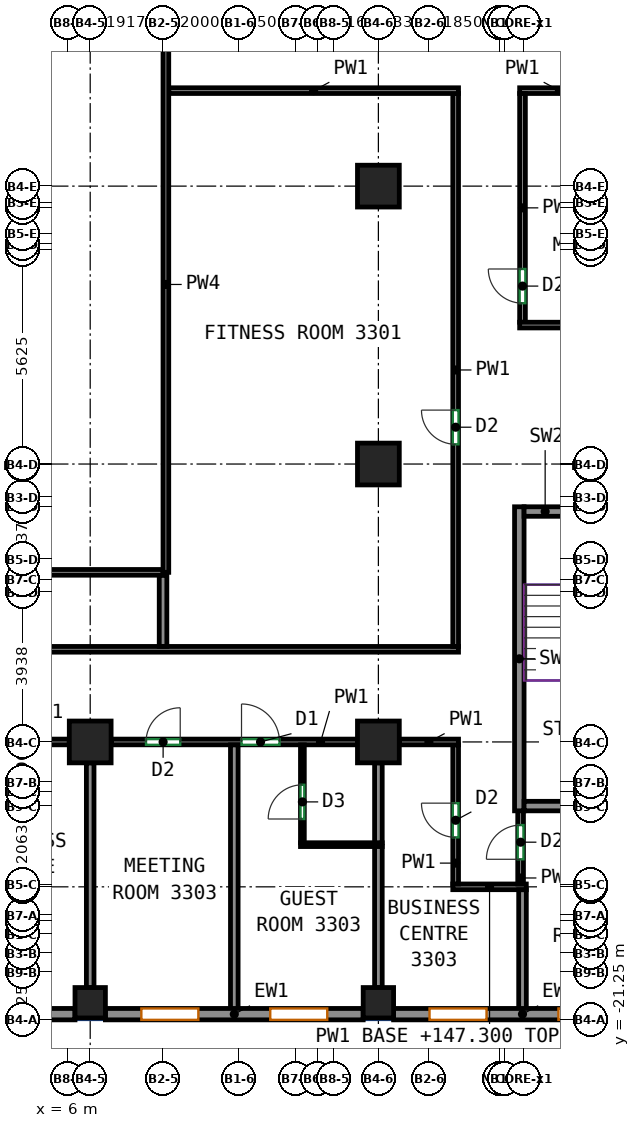
"""IFC4 building model, lengths in metres.
Left out: names, types, materials, properties, quantities, classifications, styles, units other than length and angle.
Written with IfcOpenShell. Run it as: python <this file> out.ifc"""

import sys

from ifc_helpers import new_model, si_unit, direction, frame, frame_2d, origin, origin_2d, place, context, subcontext, project, spatial, rectangle, extrude, source, transform, mapped, element, fill, save


model = new_model("IFC4")
c1 = context("Model", 3, precision=1e-05, world=origin(), true_north=direction((0.0, 1.0)))
c2 = subcontext(c1, "Body", "Model", "MODEL_VIEW")
j1 = project(units=[si_unit("LENGTHUNIT", "METRE"), si_unit("PLANEANGLEUNIT", "RADIAN")], contexts=[c1])
p1 = place(None, origin())
s1 = spatial("IfcSite", under=j1, at=p1, CompositionType="ELEMENT")
p2 = place(p1, origin())
s2 = spatial("IfcBuilding", under=s1, at=p2, CompositionType="ELEMENT")
p3 = place(p2, frame((0.0, 0.0, 147.3)))
s3 = spatial("IfcBuildingStorey", under=s2, at=p3, CompositionType="ELEMENT", Elevation=147.3)
m1 = source(origin(), c2, "Body", "SweptSolid", [
    extrude(rectangle(XDim=0.8, YDim=0.8, at=origin_2d()), origin(), (0.0, 0.0, 1.0), 3.12),
])
p4 = place(p3, frame((6.583, -20.8, 0.0), z_axis=(0.0, 0.0, 1.0), x_axis=(1.0, 0.0, 0.0)))
e1 = element("IfcColumn", 1, at=p4, inside=s3, PredefinedType="COLUMN", context=c2, shape_type="MappedRepresentation", body=[
    mapped(m1, transform((0.0, 0.0, 0.0))),
])
m2 = source(origin(), c2, "Body", "SweptSolid", [
    extrude(rectangle(XDim=1.1, YDim=1.1, at=origin_2d()), origin(), (0.0, 0.0, 1.0), 3.12),
])
p5 = place(p3, frame((6.583, -13.938, 0.0), z_axis=(0.0, 0.0, 1.0), x_axis=(1.0, 0.0, 0.0)))
e2 = element("IfcColumn", 2, at=p5, inside=s3, PredefinedType="COLUMN", context=c2, shape_type="MappedRepresentation", body=[
    mapped(m2, transform((0.0, 0.0, 0.0))),
])
p6 = place(p3, frame((14.167, -20.8, 0.0), z_axis=(0.0, 0.0, 1.0), x_axis=(1.0, 0.0, 0.0)))
e3 = element("IfcColumn", 3, at=p6, inside=s3, PredefinedType="COLUMN", context=c2, shape_type="MappedRepresentation", body=[
    mapped(m1, transform((0.0, 0.0, 0.0))),
])
for number, where, z_axis, x_axis in (
    (4, (14.167, -13.938, 0.0), (0.0, 0.0, 1.0), (1.0, 0.0, 0.0)),
    (5, (14.167, -6.625, 0.0), (0.0, 0.0, 1.0), (1.0, 0.0, 0.0)),
    (6, (14.167, 0.688, 0.0), (0.0, 0.0, 1.0), (1.0, 0.0, 0.0)),
):
    element("IfcColumn", number, at=place(p3, frame(where, z_axis=z_axis, x_axis=x_axis)), inside=s3, PredefinedType="COLUMN", context=c2, shape_type="MappedRepresentation", body=[
        mapped(m2, transform((0.0, 0.0, 0.0))),
    ])
m3 = source(origin(), c2, "Body", "SweptSolid", [
    extrude(rectangle(XDim=8.0, YDim=0.25, at=frame_2d((4.0, 0.0))), origin(), (0.0, 0.0, 1.0), 3.12),
])
p7 = place(p3, frame((17.875, -15.75, 0.0), z_axis=(0.0, 0.0, 1.0), x_axis=(0.0, 1.0, 0.0)))
e7 = element("IfcWall", 7, at=p7, inside=s3, PredefinedType="SHEAR", context=c2, shape_type="MappedRepresentation", body=[
    mapped(m3, transform((0.0, 0.0, 0.0))),
])
m4 = source(origin(), c2, "Body", "SweptSolid", [
    extrude(rectangle(XDim=3.7, YDim=0.25, at=frame_2d((1.85, 0.0))), origin(), (0.0, 0.0, 1.0), 3.12),
])
p8 = place(p3, frame((18.0, -15.625, 0.0), z_axis=(0.0, 0.0, 1.0), x_axis=(1.0, 0.0, 0.0)))
e8 = element("IfcWall", 8, at=p8, inside=s3, PredefinedType="SHEAR", context=c2, shape_type="MappedRepresentation", body=[
    mapped(m4, transform((0.0, 0.0, 0.0))),
])
p9 = place(p3, frame((18.0, -7.875, 0.0), z_axis=(0.0, 0.0, 1.0), x_axis=(1.0, 0.0, 0.0)))
e9 = element("IfcWall", 9, at=p9, inside=s3, PredefinedType="SHEAR", context=c2, shape_type="MappedRepresentation", body=[
    mapped(m4, transform((0.0, 0.0, 0.0))),
])
p10 = place(p9, frame((1.25, 0.0, 0.0)))
e10 = element("IfcOpeningElement", 10, at=p10, cuts=e9, PredefinedType="OPENING", context=c2, shape_type="SweptSolid", body=[
    extrude(rectangle(XDim=1.2, YDim=2.1, at=frame_2d((0.6, 1.05))), frame((0.0, 0.135, 0.0), z_axis=(0.0, -1.0, 0.0), x_axis=(1.0, 0.0, 0.0)), (0.0, 0.0, 1.0), 0.27),
])
m5 = source(origin(), c2, "Body", "SweptSolid", [
    extrude(rectangle(XDim=6.783, YDim=0.3, at=frame_2d((3.392, 0.0))), origin(), (0.0, 0.0, 1.0), 3.12),
])
p11 = place(p3, frame((-0.6, -21.1, 0.0), z_axis=(0.0, 0.0, 1.0), x_axis=(1.0, 0.0, 0.0)))
e11 = element("IfcWall", 11, at=p11, inside=s3, PredefinedType="SOLIDWALL", context=c2, shape_type="MappedRepresentation", body=[
    mapped(m5, transform((0.0, 0.0, 0.0))),
])
p12 = place(p11, frame((0.946, 0.0, 0.85)))
e12 = element("IfcOpeningElement", 12, at=p12, cuts=e11, PredefinedType="OPENING", context=c2, shape_type="SweptSolid", body=[
    extrude(rectangle(XDim=1.5, YDim=1.95, at=frame_2d((0.75, 0.975))), frame((0.0, 0.16, 0.0), z_axis=(0.0, -1.0, 0.0), x_axis=(1.0, 0.0, 0.0)), (0.0, 0.0, 1.0), 0.32),
])
p13 = place(p11, frame((4.337, 0.0, 0.85)))
e13 = element("IfcOpeningElement", 13, at=p13, cuts=e11, PredefinedType="OPENING", context=c2, shape_type="SweptSolid", body=[
    extrude(rectangle(XDim=1.5, YDim=1.95, at=frame_2d((0.75, 0.975))), frame((0.0, 0.16, 0.0), z_axis=(0.0, -1.0, 0.0), x_axis=(1.0, 0.0, 0.0)), (0.0, 0.0, 1.0), 0.32),
])
m6 = source(origin(), c2, "Body", "SweptSolid", [
    extrude(rectangle(XDim=6.783, YDim=0.3, at=frame_2d((3.392, 0.0))), origin(), (0.0, 0.0, 1.0), 3.12),
])
p14 = place(p3, frame((6.983, -21.1, 0.0), z_axis=(0.0, 0.0, 1.0), x_axis=(1.0, 0.0, 0.0)))
e14 = element("IfcWall", 14, at=p14, inside=s3, PredefinedType="SOLIDWALL", context=c2, shape_type="MappedRepresentation", body=[
    mapped(m6, transform((0.0, 0.0, 0.0))),
])
p15 = place(p14, frame((0.946, 0.0, 0.85)))
e15 = element("IfcOpeningElement", 15, at=p15, cuts=e14, PredefinedType="OPENING", context=c2, shape_type="SweptSolid", body=[
    extrude(rectangle(XDim=1.5, YDim=1.95, at=frame_2d((0.75, 0.975))), frame((0.0, 0.16, 0.0), z_axis=(0.0, -1.0, 0.0), x_axis=(1.0, 0.0, 0.0)), (0.0, 0.0, 1.0), 0.32),
])
p16 = place(p14, frame((4.338, 0.0, 0.85)))
e16 = element("IfcOpeningElement", 16, at=p16, cuts=e14, PredefinedType="OPENING", context=c2, shape_type="SweptSolid", body=[
    extrude(rectangle(XDim=1.5, YDim=1.95, at=frame_2d((0.75, 0.975))), frame((0.0, 0.16, 0.0), z_axis=(0.0, -1.0, 0.0), x_axis=(1.0, 0.0, 0.0)), (0.0, 0.0, 1.0), 0.32),
])
p17 = place(p3, frame((14.567, -21.1, 0.0), z_axis=(0.0, 0.0, 1.0), x_axis=(1.0, 0.0, 0.0)))
e17 = element("IfcWall", 17, at=p17, inside=s3, PredefinedType="SOLIDWALL", context=c2, shape_type="MappedRepresentation", body=[
    mapped(m5, transform((0.0, 0.0, 0.0))),
])
p18 = place(p17, frame((0.946, 0.0, 0.85)))
e18 = element("IfcOpeningElement", 18, at=p18, cuts=e17, PredefinedType="OPENING", context=c2, shape_type="SweptSolid", body=[
    extrude(rectangle(XDim=1.5, YDim=1.95, at=frame_2d((0.75, 0.975))), frame((0.0, 0.16, 0.0), z_axis=(0.0, -1.0, 0.0), x_axis=(1.0, 0.0, 0.0)), (0.0, 0.0, 1.0), 0.32),
])
p19 = place(p17, frame((4.337, 0.0, 0.85)))
e19 = element("IfcOpeningElement", 19, at=p19, cuts=e17, PredefinedType="OPENING", context=c2, shape_type="SweptSolid", body=[
    extrude(rectangle(XDim=1.5, YDim=1.95, at=frame_2d((0.75, 0.975))), frame((0.0, 0.16, 0.0), z_axis=(0.0, -1.0, 0.0), x_axis=(1.0, 0.0, 0.0)), (0.0, 0.0, 1.0), 0.32),
])
p20 = place(p3, frame((-0.45, -13.938, 0.0), z_axis=(0.0, 0.0, 1.0), x_axis=(1.0, 0.0, 0.0)))
e20 = element("IfcWall", 20, at=p20, inside=s3, PredefinedType="PARTITIONING", context=c2, shape_type="SweptSolid", body=[
    extrude(rectangle(XDim=6.483, YDim=0.15, at=frame_2d((3.241, 0.0))), origin(), (0.0, 0.0, 1.0), 3.12),
])
p21 = place(p20, frame((1.909, 0.0, 0.0)))
e21 = element("IfcOpeningElement", 21, at=p21, cuts=e20, PredefinedType="OPENING", context=c2, shape_type="SweptSolid", body=[
    extrude(rectangle(XDim=1.0, YDim=2.1, at=frame_2d((0.5, 1.05))), frame((0.0, 0.085, 0.0), z_axis=(0.0, -1.0, 0.0), x_axis=(1.0, 0.0, 0.0)), (0.0, 0.0, 1.0), 0.17),
])
p22 = place(p20, frame((3.968, 0.0, 0.0)))
e22 = element("IfcOpeningElement", 22, at=p22, cuts=e20, PredefinedType="OPENING", context=c2, shape_type="SweptSolid", body=[
    extrude(rectangle(XDim=0.9, YDim=2.1, at=frame_2d((0.45, 1.05))), frame((0.0, 0.085, 0.0), z_axis=(0.0, -1.0, 0.0), x_axis=(1.0, 0.0, 0.0)), (0.0, 0.0, 1.0), 0.17),
])
p23 = place(p3, frame((7.133, -13.938, 0.0), z_axis=(0.0, 0.0, 1.0), x_axis=(1.0, 0.0, 0.0)))
e23 = element("IfcWall", 23, at=p23, inside=s3, PredefinedType="PARTITIONING", context=c2, shape_type="SweptSolid", body=[
    extrude(rectangle(XDim=6.484, YDim=0.15, at=frame_2d((3.242, 0.0))), origin(), (0.0, 0.0, 1.0), 3.12),
])
p24 = place(p23, frame((0.919, 0.0, 0.0)))
e24 = element("IfcOpeningElement", 24, at=p24, cuts=e23, PredefinedType="OPENING", context=c2, shape_type="SweptSolid", body=[
    extrude(rectangle(XDim=0.9, YDim=2.1, at=frame_2d((0.45, 1.05))), frame((0.0, 0.085, 0.0), z_axis=(0.0, -1.0, 0.0), x_axis=(1.0, 0.0, 0.0)), (0.0, 0.0, 1.0), 0.17),
])
p25 = place(p23, frame((3.432, 0.0, 0.0)))
e25 = element("IfcOpeningElement", 25, at=p25, cuts=e23, PredefinedType="OPENING", context=c2, shape_type="SweptSolid", body=[
    extrude(rectangle(XDim=1.0, YDim=2.1, at=frame_2d((0.5, 1.05))), frame((0.0, 0.085, 0.0), z_axis=(0.0, -1.0, 0.0), x_axis=(1.0, 0.0, 0.0)), (0.0, 0.0, 1.0), 0.17),
])
p26 = place(p3, frame((16.125, -17.75, 0.0), z_axis=(0.0, 0.0, 1.0), x_axis=(1.0, 0.0, 0.0)))
e26 = element("IfcWall", 26, at=p26, inside=s3, PredefinedType="PARTITIONING", context=c2, shape_type="SweptSolid", body=[
    extrude(rectangle(XDim=1.934, YDim=0.15, at=frame_2d((0.967, 0.0))), origin(), (0.0, 0.0, 1.0), 2.52),
])
p27 = place(p3, frame((16.2, -17.675, 0.0), z_axis=(0.0, 0.0, 1.0), x_axis=(0.0, 1.0, 0.0)))
e27 = element("IfcWall", 27, at=p27, inside=s3, PredefinedType="PARTITIONING", context=c2, shape_type="SweptSolid", body=[
    extrude(rectangle(XDim=3.662, YDim=0.15, at=frame_2d((1.831, 0.0))), origin(), (0.0, 0.0, 1.0), 3.12),
])
p28 = place(p27, frame((1.227, 0.0, 0.0)))
e28 = element("IfcOpeningElement", 28, at=p28, cuts=e27, PredefinedType="OPENING", context=c2, shape_type="SweptSolid", body=[
    extrude(rectangle(XDim=0.9, YDim=2.1, at=frame_2d((0.45, 1.05))), frame((0.0, 0.085, 0.0), z_axis=(0.0, -1.0, 0.0), x_axis=(1.0, 0.0, 0.0)), (0.0, 0.0, 1.0), 0.17),
])
p29 = place(p3, frame((14.717, -13.938, 0.0), z_axis=(0.0, 0.0, 1.0), x_axis=(1.0, 0.0, 0.0)))
e29 = element("IfcWall", 29, at=p29, inside=s3, PredefinedType="PARTITIONING", context=c2, shape_type="SweptSolid", body=[
    extrude(rectangle(XDim=1.558, YDim=0.15, at=frame_2d((0.779, 0.0))), origin(), (0.0, 0.0, 1.0), 3.12),
])
p30 = place(p3, frame((17.909, -17.675, 0.0), z_axis=(0.0, 0.0, 1.0), x_axis=(0.0, 1.0, 0.0)))
e30 = element("IfcWall", 30, at=p30, inside=s3, PredefinedType="PARTITIONING", context=c2, shape_type="SweptSolid", body=[
    extrude(rectangle(XDim=1.975, YDim=0.15, at=frame_2d((0.988, 0.0))), origin(), (0.0, 0.0, 1.0), 3.12),
])
p31 = place(p30, frame((0.65, 0.0, 0.0)))
e31 = element("IfcOpeningElement", 31, at=p31, cuts=e30, PredefinedType="OPENING", context=c2, shape_type="SweptSolid", body=[
    extrude(rectangle(XDim=0.9, YDim=2.1, at=frame_2d((0.45, 1.05))), frame((0.0, 0.085, 0.0), z_axis=(0.0, -1.0, 0.0), x_axis=(1.0, 0.0, 0.0)), (0.0, 0.0, 1.0), 0.17),
])
p32 = place(p3, frame((17.884, 3.2, 0.0), z_axis=(0.0, 0.0, 1.0), x_axis=(1.0, 0.0, 0.0)))
e32 = element("IfcWall", 32, at=p32, inside=s3, PredefinedType="PARTITIONING", context=c2, shape_type="SweptSolid", body=[
    extrude(rectangle(XDim=2.091, YDim=0.15, at=frame_2d((1.045, 0.0))), origin(), (0.0, 0.0, 1.0), 3.12),
])
p33 = place(p3, frame((17.959, -2.894, 0.0), z_axis=(0.0, 0.0, 1.0), x_axis=(0.0, 1.0, 0.0)))
e33 = element("IfcWall", 33, at=p33, inside=s3, PredefinedType="PARTITIONING", context=c2, shape_type="SweptSolid", body=[
    extrude(rectangle(XDim=6.019, YDim=0.15, at=frame_2d((3.01, 0.0))), origin(), (0.0, 0.0, 1.0), 3.12),
])
p34 = place(p33, frame((0.501, 0.0, 0.0)))
e34 = element("IfcOpeningElement", 34, at=p34, cuts=e33, PredefinedType="OPENING", context=c2, shape_type="SweptSolid", body=[
    extrude(rectangle(XDim=0.9, YDim=2.1, at=frame_2d((0.45, 1.05))), frame((0.0, 0.085, 0.0), z_axis=(0.0, -1.0, 0.0), x_axis=(1.0, 0.0, 0.0)), (0.0, 0.0, 1.0), 0.17),
])
p35 = place(p3, frame((21.751, -2.969, 0.0), z_axis=(0.0, 0.0, 1.0), x_axis=(-1.0, 0.0, 0.0)))
e35 = element("IfcWall", 35, at=p35, inside=s3, PredefinedType="PARTITIONING", context=c2, shape_type="SweptSolid", body=[
    extrude(rectangle(XDim=3.867, YDim=0.15, at=frame_2d((1.934, 0.0))), origin(), (0.0, 0.0, 1.0), 3.12),
])
p36 = place(p3, frame((-12.075, -11.5, 0.0), z_axis=(0.0, 0.0, 1.0), x_axis=(1.0, 0.0, 0.0)))
e36 = element("IfcWall", 36, at=p36, inside=s3, PredefinedType="PARTITIONING", context=c2, shape_type="SweptSolid", body=[
    extrude(rectangle(XDim=28.35, YDim=0.15, at=frame_2d((14.175, 0.0))), origin(), (0.0, 0.0, 1.0), 3.12),
])
p37 = place(p36, frame((13.677, 0.0, 0.0)))
e37 = element("IfcOpeningElement", 37, at=p37, cuts=e36, PredefinedType="OPENING", context=c2, shape_type="SweptSolid", body=[
    extrude(rectangle(XDim=0.9, YDim=2.1, at=frame_2d((0.45, 1.05))), frame((0.0, 0.085, 0.0), z_axis=(0.0, -1.0, 0.0), x_axis=(1.0, 0.0, 0.0)), (0.0, 0.0, 1.0), 0.17),
])
p38 = place(p3, frame((16.2, -11.425, 0.0), z_axis=(0.0, 0.0, 1.0), x_axis=(0.0, 1.0, 0.0)))
e38 = element("IfcWall", 38, at=p38, inside=s3, PredefinedType="PARTITIONING", context=c2, shape_type="SweptSolid", body=[
    extrude(rectangle(XDim=14.55, YDim=0.15, at=frame_2d((7.275, 0.0))), origin(), (0.0, 0.0, 1.0), 3.12),
])
p39 = place(p38, frame((5.319, 0.0, 0.0)))
e39 = element("IfcOpeningElement", 39, at=p39, cuts=e38, PredefinedType="OPENING", context=c2, shape_type="SweptSolid", body=[
    extrude(rectangle(XDim=0.9, YDim=2.1, at=frame_2d((0.45, 1.05))), frame((0.0, 0.085, 0.0), z_axis=(0.0, -1.0, 0.0), x_axis=(1.0, 0.0, 0.0)), (0.0, 0.0, 1.0), 0.17),
])
p40 = place(p3, frame((8.65, 3.2, 0.0), z_axis=(0.0, 0.0, 1.0), x_axis=(1.0, 0.0, 0.0)))
e40 = element("IfcWall", 40, at=p40, inside=s3, PredefinedType="PARTITIONING", context=c2, shape_type="SweptSolid", body=[
    extrude(rectangle(XDim=7.625, YDim=0.15, at=frame_2d((3.812, 0.0))), origin(), (0.0, 0.0, 1.0), 3.12),
])
p41 = place(p3, frame((6.583, -20.4, 0.0), z_axis=(0.0, 0.0, 1.0), x_axis=(0.0, 1.0, 0.0)))
e41 = element("IfcWall", 41, at=p41, inside=s3, PredefinedType="PARTITIONING", context=c2, shape_type="SweptSolid", body=[
    extrude(rectangle(XDim=5.912, YDim=0.2, at=frame_2d((2.956, 0.0))), origin(), (0.0, 0.0, 1.0), 3.12),
])
p42 = place(p3, frame((10.375, -21.0, 0.0), z_axis=(0.0, 0.0, 1.0), x_axis=(0.0, 1.0, 0.0)))
e42 = element("IfcWall", 42, at=p42, inside=s3, PredefinedType="PARTITIONING", context=c2, shape_type="SweptSolid", body=[
    extrude(rectangle(XDim=6.985, YDim=0.2, at=frame_2d((3.493, 0.0))), origin(), (0.0, 0.0, 1.0), 3.12),
])
p43 = place(p3, frame((12.167, -16.59, 0.0), z_axis=(0.0, 0.0, 1.0), x_axis=(0.0, 1.0, 0.0)))
e43 = element("IfcWall", 43, at=p43, inside=s3, PredefinedType="PARTITIONING", context=c2, shape_type="SweptSolid", body=[
    extrude(rectangle(XDim=2.575, YDim=0.1, at=frame_2d((1.288, 0.0))), origin(), (0.0, 0.0, 1.0), 3.12),
])
p44 = place(p43, frame((0.625, 0.0, 0.0)))
e44 = element("IfcOpeningElement", 44, at=p44, cuts=e43, PredefinedType="OPENING", context=c2, shape_type="SweptSolid", body=[
    extrude(rectangle(XDim=0.9, YDim=2.1, at=frame_2d((0.45, 1.05))), frame((0.0, 0.06, 0.0), z_axis=(0.0, -1.0, 0.0), x_axis=(1.0, 0.0, 0.0)), (0.0, 0.0, 1.0), 0.12),
])
p45 = place(p3, frame((12.117, -16.64, 0.0), z_axis=(0.0, 0.0, 1.0), x_axis=(1.0, 0.0, 0.0)))
e45 = element("IfcWall", 45, at=p45, inside=s3, PredefinedType="PARTITIONING", context=c2, shape_type="SweptSolid", body=[
    extrude(rectangle(XDim=2.15, YDim=0.1, at=frame_2d((1.075, 0.0))), origin(), (0.0, 0.0, 1.0), 3.12),
])
p46 = place(p3, frame((14.167, -20.4, 0.0), z_axis=(0.0, 0.0, 1.0), x_axis=(0.0, 1.0, 0.0)))
e46 = element("IfcWall", 46, at=p46, inside=s3, PredefinedType="PARTITIONING", context=c2, shape_type="SweptSolid", body=[
    extrude(rectangle(XDim=3.71, YDim=0.2, at=frame_2d((1.855, 0.0))), origin(), (0.0, 0.0, 1.0), 3.12),
])
p47 = place(p3, frame((14.167, -16.59, 0.0), z_axis=(0.0, 0.0, 1.0), x_axis=(0.0, 1.0, 0.0)))
e47 = element("IfcWall", 47, at=p47, inside=s3, PredefinedType="PARTITIONING", context=c2, shape_type="SweptSolid", body=[
    extrude(rectangle(XDim=2.102, YDim=0.2, at=frame_2d((1.051, 0.0))), origin(), (0.0, 0.0, 1.0), 3.12),
])
p48 = place(p3, frame((17.959, -21.0, 0.0), z_axis=(0.0, 0.0, 1.0), x_axis=(0.0, 1.0, 0.0)))
e48 = element("IfcWall", 48, at=p48, inside=s3, PredefinedType="PARTITIONING", context=c2, shape_type="SweptSolid", body=[
    extrude(rectangle(XDim=3.173, YDim=0.2, at=frame_2d((1.586, 0.0))), origin(), (0.0, 0.0, 1.0), 3.12),
])
p49 = place(p3, frame((8.5, -11.423, 0.0), z_axis=(0.0, 0.0, 1.0), x_axis=(0.0, 1.0, 0.0)))
e49 = element("IfcWall", 49, at=p49, inside=s3, PredefinedType="PARTITIONING", context=c2, shape_type="SweptSolid", body=[
    extrude(rectangle(XDim=1.873, YDim=0.2, at=frame_2d((0.937, 0.0))), origin(), (0.0, 0.0, 1.0), 3.12),
])
p50 = place(p3, frame((8.5, -9.475, 0.0), z_axis=(0.0, 0.0, 1.0), x_axis=(-1.0, 0.0, 0.0)))
e50 = element("IfcWall", 50, at=p50, inside=s3, PredefinedType="PARTITIONING", context=c2, shape_type="SweptSolid", body=[
    extrude(rectangle(XDim=15.075, YDim=0.15, at=frame_2d((7.538, 0.0))), origin(), (0.0, 0.0, 1.0), 3.12),
])
p51 = place(p3, frame((8.575, 5.675, 0.0), z_axis=(0.0, 0.0, 1.0), x_axis=(0.0, -1.0, 0.0)))
e51 = element("IfcWall", 51, at=p51, inside=s3, PredefinedType="PARTITIONING", context=c2, shape_type="SweptSolid", body=[
    extrude(rectangle(XDim=15.15, YDim=0.15, at=frame_2d((7.575, 0.0))), origin(), (0.0, 0.0, 1.0), 3.12),
])
p52 = place(p15, origin())
e52 = element("IfcWindow", 52, at=p52, inside=s3, PartitioningType="SINGLE_PANEL", PredefinedType="WINDOW", context=c2, shape_type="SweptSolid", body=[
    extrude(rectangle(XDim=1.5, YDim=1.95, at=frame_2d((0.75, 0.975))), frame((0.0, 0.03, 0.0), z_axis=(0.0, -1.0, 0.0), x_axis=(1.0, 0.0, 0.0)), (0.0, 0.0, 1.0), 0.06),
])
fill(e15, e52)
p53 = place(p16, origin())
e53 = element("IfcWindow", 53, at=p53, inside=s3, PartitioningType="SINGLE_PANEL", PredefinedType="WINDOW", context=c2, shape_type="SweptSolid", body=[
    extrude(rectangle(XDim=1.5, YDim=1.95, at=frame_2d((0.75, 0.975))), frame((0.0, 0.03, 0.0), z_axis=(0.0, -1.0, 0.0), x_axis=(1.0, 0.0, 0.0)), (0.0, 0.0, 1.0), 0.06),
])
fill(e16, e53)
p54 = place(p18, origin())
e54 = element("IfcWindow", 54, at=p54, inside=s3, PartitioningType="SINGLE_PANEL", PredefinedType="WINDOW", context=c2, shape_type="SweptSolid", body=[
    extrude(rectangle(XDim=1.5, YDim=1.95, at=frame_2d((0.75, 0.975))), frame((0.0, 0.03, 0.0), z_axis=(0.0, -1.0, 0.0), x_axis=(1.0, 0.0, 0.0)), (0.0, 0.0, 1.0), 0.06),
])
fill(e18, e54)
p55 = place(p19, origin())
e55 = element("IfcWindow", 55, at=p55, inside=s3, PartitioningType="SINGLE_PANEL", PredefinedType="WINDOW", context=c2, shape_type="SweptSolid", body=[
    extrude(rectangle(XDim=1.5, YDim=1.95, at=frame_2d((0.75, 0.975))), frame((0.0, 0.03, 0.0), z_axis=(0.0, -1.0, 0.0), x_axis=(1.0, 0.0, 0.0)), (0.0, 0.0, 1.0), 0.06),
])
fill(e19, e55)
p56 = place(p31, origin())
e56 = element("IfcDoor", 56, at=p56, inside=s3, OperationType="SINGLE_SWING_LEFT", PredefinedType="DOOR", context=c2, shape_type="SweptSolid", body=[
    extrude(rectangle(XDim=0.9, YDim=2.1, at=frame_2d((0.45, 1.05))), frame((0.0, 0.025, 0.0), z_axis=(0.0, -1.0, 0.0), x_axis=(1.0, 0.0, 0.0)), (0.0, 0.0, 1.0), 0.05),
])
fill(e31, e56)
p57 = place(p28, origin())
e57 = element("IfcDoor", 57, at=p57, inside=s3, OperationType="SINGLE_SWING_RIGHT", PredefinedType="DOOR", context=c2, shape_type="SweptSolid", body=[
    extrude(rectangle(XDim=0.9, YDim=2.1, at=frame_2d((0.45, 1.05))), frame((0.0, 0.025, 0.0), z_axis=(0.0, -1.0, 0.0), x_axis=(1.0, 0.0, 0.0)), (0.0, 0.0, 1.0), 0.05),
])
fill(e28, e57)
p58 = place(p44, origin())
e58 = element("IfcDoor", 58, at=p58, inside=s3, OperationType="SINGLE_SWING_LEFT", PredefinedType="DOOR", context=c2, shape_type="SweptSolid", body=[
    extrude(rectangle(XDim=0.9, YDim=2.1, at=frame_2d((0.45, 1.05))), frame((0.0, 0.025, 0.0), z_axis=(0.0, -1.0, 0.0), x_axis=(1.0, 0.0, 0.0)), (0.0, 0.0, 1.0), 0.05),
])
fill(e44, e58)
p59 = place(p24, origin())
e59 = element("IfcDoor", 59, at=p59, inside=s3, OperationType="SINGLE_SWING_RIGHT", PredefinedType="DOOR", context=c2, shape_type="SweptSolid", body=[
    extrude(rectangle(XDim=0.9, YDim=2.1, at=frame_2d((0.45, 1.05))), frame((0.0, 0.025, 0.0), z_axis=(0.0, -1.0, 0.0), x_axis=(1.0, 0.0, 0.0)), (0.0, 0.0, 1.0), 0.05),
])
fill(e24, e59)
p60 = place(p25, origin())
e60 = element("IfcDoor", 60, at=p60, inside=s3, OperationType="SINGLE_SWING_LEFT", PredefinedType="DOOR", context=c2, shape_type="SweptSolid", body=[
    extrude(rectangle(XDim=1.0, YDim=2.1, at=frame_2d((0.5, 1.05))), frame((0.0, 0.025, 0.0), z_axis=(0.0, -1.0, 0.0), x_axis=(1.0, 0.0, 0.0)), (0.0, 0.0, 1.0), 0.05),
])
fill(e25, e60)
p61 = place(p39, origin())
e61 = element("IfcDoor", 61, at=p61, inside=s3, OperationType="SINGLE_SWING_RIGHT", PredefinedType="DOOR", context=c2, shape_type="SweptSolid", body=[
    extrude(rectangle(XDim=0.9, YDim=2.1, at=frame_2d((0.45, 1.05))), frame((0.0, 0.025, 0.0), z_axis=(0.0, -1.0, 0.0), x_axis=(1.0, 0.0, 0.0)), (0.0, 0.0, 1.0), 0.05),
])
fill(e39, e61)
p62 = place(p34, origin())
e62 = element("IfcDoor", 62, at=p62, inside=s3, OperationType="SINGLE_SWING_RIGHT", PredefinedType="DOOR", context=c2, shape_type="SweptSolid", body=[
    extrude(rectangle(XDim=0.9, YDim=2.1, at=frame_2d((0.45, 1.05))), frame((0.0, 0.025, 0.0), z_axis=(0.0, -1.0, 0.0), x_axis=(1.0, 0.0, 0.0)), (0.0, 0.0, 1.0), 0.05),
])
fill(e34, e62)
save(model, sys.argv[1])
